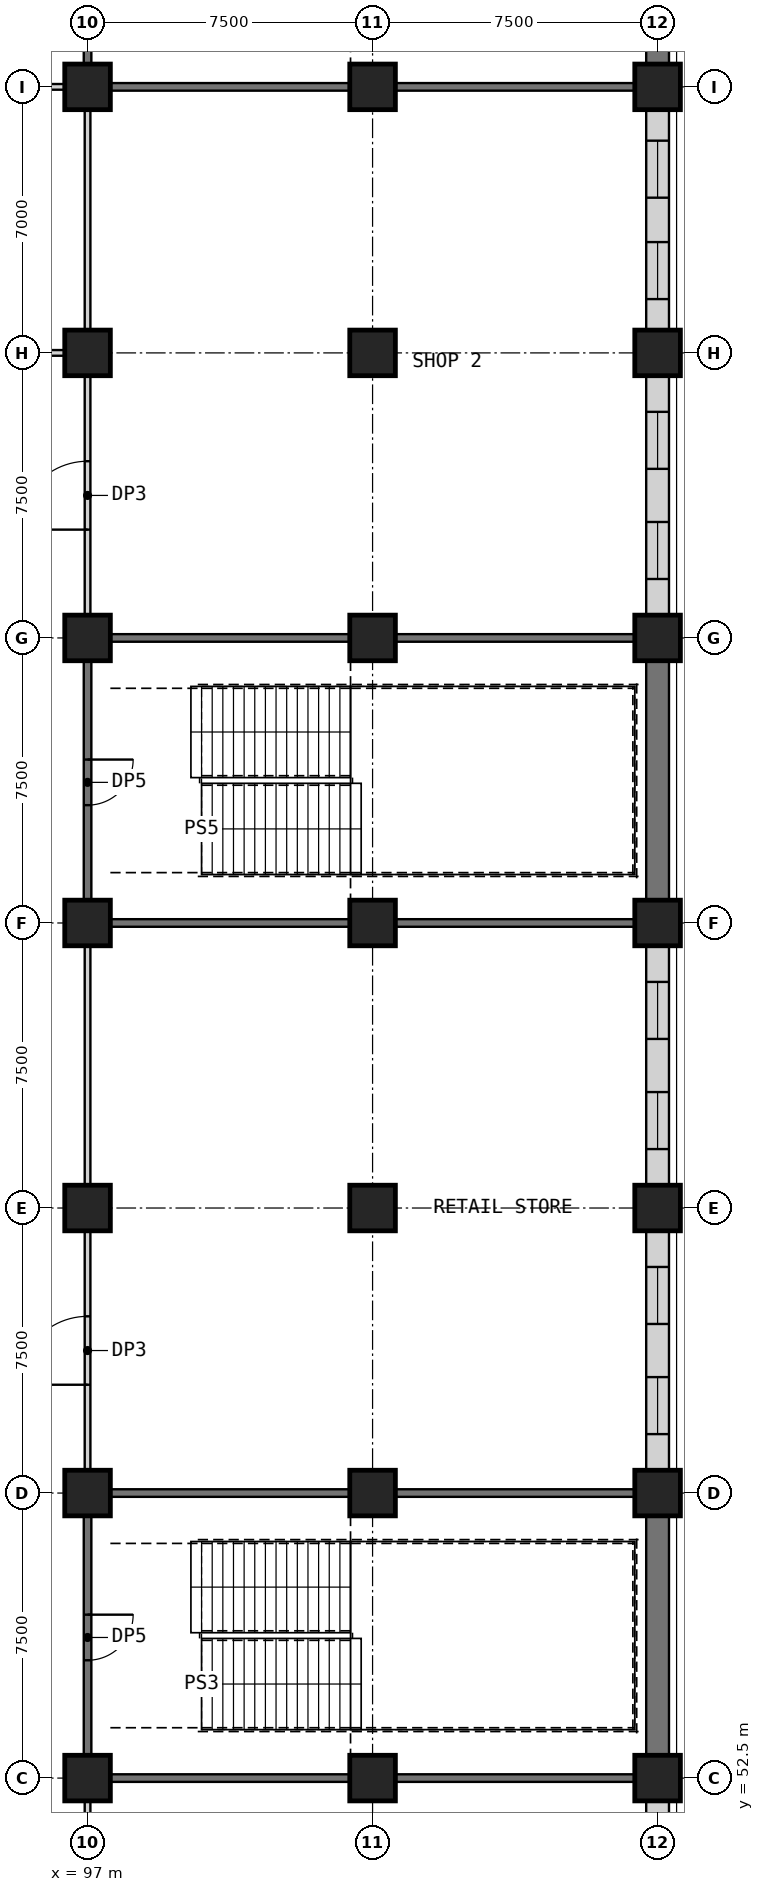
"""IFC4 building model, lengths in metres.
Left out: names, types, materials, properties, quantities, classifications, styles, units other than length and angle.
Written with IfcOpenShell. Run it as: python <this file> out.ifc"""

import sys

from ifc_helpers import new_model, si_unit, direction, frame, frame_2d, origin, origin_2d, place, context, subcontext, project, spatial, rectangle, extrude, element, fill, save


model = new_model("IFC4")
c1 = context("Model", 3, precision=1e-05, world=origin(), true_north=direction((0.0, 1.0)))
c2 = subcontext(c1, "Body", "Model", "MODEL_VIEW")
j1 = project(units=[si_unit("LENGTHUNIT", "METRE"), si_unit("PLANEANGLEUNIT", "RADIAN")], contexts=[c1])
p1 = place(None, origin())
s1 = spatial("IfcSite", under=j1, at=p1, CompositionType="ELEMENT")
p2 = place(p1, origin())
s2 = spatial("IfcBuilding", under=s1, at=p2, CompositionType="ELEMENT")
p3 = place(p2, frame((0.0, 0.0, 13.5)))
s3 = spatial("IfcBuildingStorey", under=s2, at=p3, CompositionType="ELEMENT", Elevation=13.5)
for number, where, z_axis, x_axis in (
    (1, (97.0, 52.5, 0.0), (0.0, 0.0, 1.0), (1.0, 0.0, 0.0)),
    (2, (97.0, 60.0, 0.0), (0.0, 0.0, 1.0), (1.0, 0.0, 0.0)),
    (3, (97.0, 67.5, 0.0), (0.0, 0.0, 1.0), (1.0, 0.0, 0.0)),
    (4, (97.0, 75.0, 0.0), (0.0, 0.0, 1.0), (1.0, 0.0, 0.0)),
    (5, (97.0, 82.5, 0.0), (0.0, 0.0, 1.0), (1.0, 0.0, 0.0)),
    (6, (97.0, 90.0, 0.0), (0.0, 0.0, 1.0), (1.0, 0.0, 0.0)),
    (7, (97.0, 97.0, 0.0), (0.0, 0.0, 1.0), (1.0, 0.0, 0.0)),
    (8, (104.5, 52.5, 0.0), (0.0, 0.0, 1.0), (1.0, 0.0, 0.0)),
    (9, (104.5, 60.0, 0.0), (0.0, 0.0, 1.0), (1.0, 0.0, 0.0)),
    (10, (104.5, 67.5, 0.0), (0.0, 0.0, 1.0), (1.0, 0.0, 0.0)),
    (11, (104.5, 75.0, 0.0), (0.0, 0.0, 1.0), (1.0, 0.0, 0.0)),
    (12, (104.5, 82.5, 0.0), (0.0, 0.0, 1.0), (1.0, 0.0, 0.0)),
    (13, (104.5, 90.0, 0.0), (0.0, 0.0, 1.0), (1.0, 0.0, 0.0)),
    (14, (104.5, 97.0, 0.0), (0.0, 0.0, 1.0), (1.0, 0.0, 0.0)),
    (15, (112.0, 52.5, 0.0), (0.0, 0.0, 1.0), (1.0, 0.0, 0.0)),
    (16, (112.0, 60.0, 0.0), (0.0, 0.0, 1.0), (1.0, 0.0, 0.0)),
    (17, (112.0, 67.5, 0.0), (0.0, 0.0, 1.0), (1.0, 0.0, 0.0)),
    (18, (112.0, 75.0, 0.0), (0.0, 0.0, 1.0), (1.0, 0.0, 0.0)),
    (19, (112.0, 82.5, 0.0), (0.0, 0.0, 1.0), (1.0, 0.0, 0.0)),
    (20, (112.0, 90.0, 0.0), (0.0, 0.0, 1.0), (1.0, 0.0, 0.0)),
    (21, (112.0, 97.0, 0.0), (0.0, 0.0, 1.0), (1.0, 0.0, 0.0)),
):
    element("IfcColumn", number, at=place(p3, frame(where, z_axis=z_axis, x_axis=x_axis)), inside=s3, PredefinedType="COLUMN", context=c2, shape_type="SweptSolid", body=[
        extrude(rectangle(XDim=1.2, YDim=1.2, at=origin_2d()), origin(), (0.0, 0.0, 1.0), 5.0),
    ])
p4 = place(p3, frame((90.0, 97.0, 0.0), z_axis=(0.0, 0.0, 1.0), x_axis=(1.0, 0.0, 0.0)))
e22 = element("IfcWall", 22, at=p4, inside=s3, PredefinedType="PARTITIONING", context=c2, shape_type="SweptSolid", body=[
    extrude(rectangle(XDim=6.4, YDim=0.15, at=frame_2d((3.2, 0.0))), origin(), (0.0, 0.0, 1.0), 4.7),
])
for number, where, z_axis, x_axis in (
    (23, (97.6, 97.0, 0.0), (0.0, 0.0, 1.0), (1.0, 0.0, 0.0)),
    (24, (105.1, 97.0, 0.0), (0.0, 0.0, 1.0), (1.0, 0.0, 0.0)),
    (25, (97.6, 52.5, 0.0), (0.0, 0.0, 1.0), (1.0, 0.0, 0.0)),
    (26, (105.1, 52.5, 0.0), (0.0, 0.0, 1.0), (1.0, 0.0, 0.0)),
    (27, (97.6, 60.0, 0.0), (0.0, 0.0, 1.0), (1.0, 0.0, 0.0)),
    (28, (105.1, 60.0, 0.0), (0.0, 0.0, 1.0), (1.0, 0.0, 0.0)),
    (29, (97.6, 75.0, 0.0), (0.0, 0.0, 1.0), (1.0, 0.0, 0.0)),
    (30, (105.1, 75.0, 0.0), (0.0, 0.0, 1.0), (1.0, 0.0, 0.0)),
    (31, (97.6, 82.5, 0.0), (0.0, 0.0, 1.0), (1.0, 0.0, 0.0)),
    (32, (105.1, 82.5, 0.0), (0.0, 0.0, 1.0), (1.0, 0.0, 0.0)),
):
    element("IfcWall", number, at=place(p3, frame(where, z_axis=z_axis, x_axis=x_axis)), inside=s3, PredefinedType="SHEAR", context=c2, shape_type="SweptSolid", body=[
        extrude(rectangle(XDim=6.3, YDim=0.2, at=frame_2d((3.15, 0.0))), origin(), (0.0, 0.0, 1.0), 4.7),
    ])
p5 = place(p3, frame((90.0, 90.0, 0.0), z_axis=(0.0, 0.0, 1.0), x_axis=(1.0, 0.0, 0.0)))
e33 = element("IfcWall", 33, at=p5, inside=s3, PredefinedType="PARTITIONING", context=c2, shape_type="SweptSolid", body=[
    extrude(rectangle(XDim=6.4, YDim=0.15, at=frame_2d((3.2, 0.0))), origin(), (0.0, 0.0, 1.0), 4.7),
])
p6 = place(p3, frame((97.0, 46.1, 0.0), z_axis=(0.0, 0.0, 1.0), x_axis=(0.0, 1.0, 0.0)))
e34 = element("IfcWall", 34, at=p6, inside=s3, PredefinedType="PARTITIONING", context=c2, shape_type="SweptSolid", body=[
    extrude(rectangle(XDim=5.8, YDim=0.15, at=frame_2d((2.9, 0.0))), origin(), (0.0, 0.0, 1.0), 4.7),
])
p7 = place(p6, frame((2.5, 0.0, 0.0)))
e35 = element("IfcOpeningElement", 35, at=p7, cuts=e34, PredefinedType="OPENING", context=c2, shape_type="SweptSolid", body=[
    extrude(rectangle(XDim=1.0, YDim=2.1, at=frame_2d((0.5, 1.05))), frame((0.0, 0.085, 0.0), z_axis=(0.0, -1.0, 0.0), x_axis=(1.0, 0.0, 0.0)), (0.0, 0.0, 1.0), 0.17),
])
p8 = place(p3, frame((97.0, 59.4, 0.0), z_axis=(0.0, 0.0, 1.0), x_axis=(0.0, -1.0, 0.0)))
e36 = element("IfcWall", 36, at=p8, inside=s3, PredefinedType="SHEAR", context=c2, shape_type="SweptSolid", body=[
    extrude(rectangle(XDim=6.3, YDim=0.2, at=frame_2d((3.15, 0.0))), origin(), (0.0, 0.0, 1.0), 4.7),
])
p9 = place(p8, frame((2.6, 0.0, 0.0)))
e37 = element("IfcOpeningElement", 37, at=p9, cuts=e36, PredefinedType="OPENING", context=c2, shape_type="SweptSolid", body=[
    extrude(rectangle(XDim=1.2, YDim=2.1, at=frame_2d((0.6, 1.05))), frame((0.0, 0.11, 0.0), z_axis=(0.0, -1.0, 0.0), x_axis=(1.0, 0.0, 0.0)), (0.0, 0.0, 1.0), 0.22),
])
p10 = place(p3, frame((97.0, 60.6, 0.0), z_axis=(0.0, 0.0, 1.0), x_axis=(0.0, 1.0, 0.0)))
e38 = element("IfcWall", 38, at=p10, inside=s3, PredefinedType="PARTITIONING", context=c2, shape_type="SweptSolid", body=[
    extrude(rectangle(XDim=6.3, YDim=0.15, at=frame_2d((3.15, 0.0))), origin(), (0.0, 0.0, 1.0), 4.7),
])
p11 = place(p10, frame((2.25, 0.0, 0.0)))
e39 = element("IfcOpeningElement", 39, at=p11, cuts=e38, PredefinedType="OPENING", context=c2, shape_type="SweptSolid", body=[
    extrude(rectangle(XDim=1.8, YDim=2.4, at=frame_2d((0.9, 1.2))), frame((0.0, 0.085, 0.0), z_axis=(0.0, -1.0, 0.0), x_axis=(1.0, 0.0, 0.0)), (0.0, 0.0, 1.0), 0.17),
])
p12 = place(p3, frame((97.0, 68.1, 0.0), z_axis=(0.0, 0.0, 1.0), x_axis=(0.0, 1.0, 0.0)))
e40 = element("IfcWall", 40, at=p12, inside=s3, PredefinedType="PARTITIONING", context=c2, shape_type="SweptSolid", body=[
    extrude(rectangle(XDim=6.3, YDim=0.15, at=frame_2d((3.15, 0.0))), origin(), (0.0, 0.0, 1.0), 4.7),
])
p13 = place(p3, frame((97.0, 81.9, 0.0), z_axis=(0.0, 0.0, 1.0), x_axis=(0.0, -1.0, 0.0)))
e41 = element("IfcWall", 41, at=p13, inside=s3, PredefinedType="SHEAR", context=c2, shape_type="SweptSolid", body=[
    extrude(rectangle(XDim=6.3, YDim=0.2, at=frame_2d((3.15, 0.0))), origin(), (0.0, 0.0, 1.0), 4.7),
])
p14 = place(p13, frame((2.6, 0.0, 0.0)))
e42 = element("IfcOpeningElement", 42, at=p14, cuts=e41, PredefinedType="OPENING", context=c2, shape_type="SweptSolid", body=[
    extrude(rectangle(XDim=1.2, YDim=2.1, at=frame_2d((0.6, 1.05))), frame((0.0, 0.11, 0.0), z_axis=(0.0, -1.0, 0.0), x_axis=(1.0, 0.0, 0.0)), (0.0, 0.0, 1.0), 0.22),
])
p15 = place(p3, frame((97.0, 83.1, 0.0), z_axis=(0.0, 0.0, 1.0), x_axis=(0.0, 1.0, 0.0)))
e43 = element("IfcWall", 43, at=p15, inside=s3, PredefinedType="PARTITIONING", context=c2, shape_type="SweptSolid", body=[
    extrude(rectangle(XDim=6.3, YDim=0.15, at=frame_2d((3.15, 0.0))), origin(), (0.0, 0.0, 1.0), 4.7),
])
p16 = place(p15, frame((2.25, 0.0, 0.0)))
e44 = element("IfcOpeningElement", 44, at=p16, cuts=e43, PredefinedType="OPENING", context=c2, shape_type="SweptSolid", body=[
    extrude(rectangle(XDim=1.8, YDim=2.4, at=frame_2d((0.9, 1.2))), frame((0.0, 0.085, 0.0), z_axis=(0.0, -1.0, 0.0), x_axis=(1.0, 0.0, 0.0)), (0.0, 0.0, 1.0), 0.17),
])
p17 = place(p3, frame((97.0, 90.6, 0.0), z_axis=(0.0, 0.0, 1.0), x_axis=(0.0, 1.0, 0.0)))
e45 = element("IfcWall", 45, at=p17, inside=s3, PredefinedType="PARTITIONING", context=c2, shape_type="SweptSolid", body=[
    extrude(rectangle(XDim=5.8, YDim=0.15, at=frame_2d((2.9, 0.0))), origin(), (0.0, 0.0, 1.0), 4.7),
])
p18 = place(p3, frame((97.0, 103.9, 0.0), z_axis=(0.0, 0.0, 1.0), x_axis=(0.0, -1.0, 0.0)))
e46 = element("IfcWall", 46, at=p18, inside=s3, PredefinedType="SHEAR", context=c2, shape_type="SweptSolid", body=[
    extrude(rectangle(XDim=6.3, YDim=0.2, at=frame_2d((3.15, 0.0))), origin(), (0.0, 0.0, 1.0), 4.7),
])
p19 = place(p18, frame((2.6, 0.0, 0.0)))
e47 = element("IfcOpeningElement", 47, at=p19, cuts=e46, PredefinedType="OPENING", context=c2, shape_type="SweptSolid", body=[
    extrude(rectangle(XDim=1.2, YDim=2.1, at=frame_2d((0.6, 1.05))), frame((0.0, 0.11, 0.0), z_axis=(0.0, -1.0, 0.0), x_axis=(1.0, 0.0, 0.0)), (0.0, 0.0, 1.0), 0.22),
])
p20 = place(p3, frame((112.0, 46.1, 0.0), z_axis=(0.0, 0.0, 1.0), x_axis=(0.0, 1.0, 0.0)))
e48 = element("IfcWall", 48, at=p20, inside=s3, PredefinedType="PARTITIONING", context=c2, shape_type="SweptSolid", body=[
    extrude(rectangle(XDim=5.8, YDim=0.6, at=frame_2d((2.9, 0.0))), origin(), (0.0, 0.0, 1.0), 4.1),
])
p21 = place(p20, frame((0.816, 0.0, 0.9)))
e49 = element("IfcOpeningElement", 49, at=p21, cuts=e48, PredefinedType="OPENING", context=c2, shape_type="SweptSolid", body=[
    extrude(rectangle(XDim=1.5, YDim=2.8, at=frame_2d((0.75, 1.4))), frame((0.0, 0.31, 0.0), z_axis=(0.0, -1.0, 0.0), x_axis=(1.0, 0.0, 0.0)), (0.0, 0.0, 1.0), 0.62),
])
p22 = place(p20, frame((3.484, 0.0, 0.9)))
e50 = element("IfcOpeningElement", 50, at=p22, cuts=e48, PredefinedType="OPENING", context=c2, shape_type="SweptSolid", body=[
    extrude(rectangle(XDim=1.5, YDim=2.8, at=frame_2d((0.75, 1.4))), frame((0.0, 0.31, 0.0), z_axis=(0.0, -1.0, 0.0), x_axis=(1.0, 0.0, 0.0)), (0.0, 0.0, 1.0), 0.62),
])
p23 = place(p3, frame((112.0, 53.1, 0.0), z_axis=(0.0, 0.0, 1.0), x_axis=(0.0, 1.0, 0.0)))
e51 = element("IfcWall", 51, at=p23, inside=s3, PredefinedType="PARTITIONING", context=c2, shape_type="SweptSolid", body=[
    extrude(rectangle(XDim=6.3, YDim=0.6, at=frame_2d((3.15, 0.0))), origin(), (0.0, 0.0, 1.0), 4.1),
])
p24 = place(p3, frame((112.0, 60.6, 0.0), z_axis=(0.0, 0.0, 1.0), x_axis=(0.0, 1.0, 0.0)))
e52 = element("IfcWall", 52, at=p24, inside=s3, PredefinedType="PARTITIONING", context=c2, shape_type="SweptSolid", body=[
    extrude(rectangle(XDim=6.3, YDim=0.6, at=frame_2d((3.15, 0.0))), origin(), (0.0, 0.0, 1.0), 4.1),
])
p25 = place(p24, frame((0.951, 0.0, 0.9)))
e53 = element("IfcOpeningElement", 53, at=p25, cuts=e52, PredefinedType="OPENING", context=c2, shape_type="SweptSolid", body=[
    extrude(rectangle(XDim=1.5, YDim=2.8, at=frame_2d((0.75, 1.4))), frame((0.0, 0.31, 0.0), z_axis=(0.0, -1.0, 0.0), x_axis=(1.0, 0.0, 0.0)), (0.0, 0.0, 1.0), 0.62),
])
p26 = place(p24, frame((3.849, 0.0, 0.9)))
e54 = element("IfcOpeningElement", 54, at=p26, cuts=e52, PredefinedType="OPENING", context=c2, shape_type="SweptSolid", body=[
    extrude(rectangle(XDim=1.5, YDim=2.8, at=frame_2d((0.75, 1.4))), frame((0.0, 0.31, 0.0), z_axis=(0.0, -1.0, 0.0), x_axis=(1.0, 0.0, 0.0)), (0.0, 0.0, 1.0), 0.62),
])
p27 = place(p3, frame((112.0, 68.1, 0.0), z_axis=(0.0, 0.0, 1.0), x_axis=(0.0, 1.0, 0.0)))
e55 = element("IfcWall", 55, at=p27, inside=s3, PredefinedType="PARTITIONING", context=c2, shape_type="SweptSolid", body=[
    extrude(rectangle(XDim=6.3, YDim=0.6, at=frame_2d((3.15, 0.0))), origin(), (0.0, 0.0, 1.0), 4.1),
])
p28 = place(p27, frame((0.951, 0.0, 0.9)))
e56 = element("IfcOpeningElement", 56, at=p28, cuts=e55, PredefinedType="OPENING", context=c2, shape_type="SweptSolid", body=[
    extrude(rectangle(XDim=1.5, YDim=2.8, at=frame_2d((0.75, 1.4))), frame((0.0, 0.31, 0.0), z_axis=(0.0, -1.0, 0.0), x_axis=(1.0, 0.0, 0.0)), (0.0, 0.0, 1.0), 0.62),
])
p29 = place(p27, frame((3.849, 0.0, 0.9)))
e57 = element("IfcOpeningElement", 57, at=p29, cuts=e55, PredefinedType="OPENING", context=c2, shape_type="SweptSolid", body=[
    extrude(rectangle(XDim=1.5, YDim=2.8, at=frame_2d((0.75, 1.4))), frame((0.0, 0.31, 0.0), z_axis=(0.0, -1.0, 0.0), x_axis=(1.0, 0.0, 0.0)), (0.0, 0.0, 1.0), 0.62),
])
p30 = place(p3, frame((112.0, 75.6, 0.0), z_axis=(0.0, 0.0, 1.0), x_axis=(0.0, 1.0, 0.0)))
e58 = element("IfcWall", 58, at=p30, inside=s3, PredefinedType="PARTITIONING", context=c2, shape_type="SweptSolid", body=[
    extrude(rectangle(XDim=6.3, YDim=0.6, at=frame_2d((3.15, 0.0))), origin(), (0.0, 0.0, 1.0), 4.1),
])
p31 = place(p3, frame((112.0, 83.1, 0.0), z_axis=(0.0, 0.0, 1.0), x_axis=(0.0, 1.0, 0.0)))
e59 = element("IfcWall", 59, at=p31, inside=s3, PredefinedType="PARTITIONING", context=c2, shape_type="SweptSolid", body=[
    extrude(rectangle(XDim=6.3, YDim=0.6, at=frame_2d((3.15, 0.0))), origin(), (0.0, 0.0, 1.0), 4.1),
])
p32 = place(p31, frame((0.951, 0.0, 0.9)))
e60 = element("IfcOpeningElement", 60, at=p32, cuts=e59, PredefinedType="OPENING", context=c2, shape_type="SweptSolid", body=[
    extrude(rectangle(XDim=1.5, YDim=2.8, at=frame_2d((0.75, 1.4))), frame((0.0, 0.31, 0.0), z_axis=(0.0, -1.0, 0.0), x_axis=(1.0, 0.0, 0.0)), (0.0, 0.0, 1.0), 0.62),
])
p33 = place(p31, frame((3.849, 0.0, 0.9)))
e61 = element("IfcOpeningElement", 61, at=p33, cuts=e59, PredefinedType="OPENING", context=c2, shape_type="SweptSolid", body=[
    extrude(rectangle(XDim=1.5, YDim=2.8, at=frame_2d((0.75, 1.4))), frame((0.0, 0.31, 0.0), z_axis=(0.0, -1.0, 0.0), x_axis=(1.0, 0.0, 0.0)), (0.0, 0.0, 1.0), 0.62),
])
p34 = place(p3, frame((112.0, 90.6, 0.0), z_axis=(0.0, 0.0, 1.0), x_axis=(0.0, 1.0, 0.0)))
e62 = element("IfcWall", 62, at=p34, inside=s3, PredefinedType="PARTITIONING", context=c2, shape_type="SweptSolid", body=[
    extrude(rectangle(XDim=5.8, YDim=0.6, at=frame_2d((2.9, 0.0))), origin(), (0.0, 0.0, 1.0), 4.1),
])
p35 = place(p34, frame((0.816, 0.0, 0.9)))
e63 = element("IfcOpeningElement", 63, at=p35, cuts=e62, PredefinedType="OPENING", context=c2, shape_type="SweptSolid", body=[
    extrude(rectangle(XDim=1.5, YDim=2.8, at=frame_2d((0.75, 1.4))), frame((0.0, 0.31, 0.0), z_axis=(0.0, -1.0, 0.0), x_axis=(1.0, 0.0, 0.0)), (0.0, 0.0, 1.0), 0.62),
])
p36 = place(p34, frame((3.484, 0.0, 0.9)))
e64 = element("IfcOpeningElement", 64, at=p36, cuts=e62, PredefinedType="OPENING", context=c2, shape_type="SweptSolid", body=[
    extrude(rectangle(XDim=1.5, YDim=2.8, at=frame_2d((0.75, 1.4))), frame((0.0, 0.31, 0.0), z_axis=(0.0, -1.0, 0.0), x_axis=(1.0, 0.0, 0.0)), (0.0, 0.0, 1.0), 0.62),
])
p37 = place(p3, frame((112.0, 97.6, 0.0), z_axis=(0.0, 0.0, 1.0), x_axis=(0.0, 1.0, 0.0)))
e65 = element("IfcWall", 65, at=p37, inside=s3, PredefinedType="PARTITIONING", context=c2, shape_type="SweptSolid", body=[
    extrude(rectangle(XDim=6.3, YDim=0.6, at=frame_2d((3.15, 0.0))), origin(), (0.0, 0.0, 1.0), 4.1),
])
p38 = place(p9, origin())
e66 = element("IfcDoor", 66, at=p38, inside=s3, OperationType="SINGLE_SWING_LEFT", PredefinedType="DOOR", context=c2, shape_type="SweptSolid", body=[
    extrude(rectangle(XDim=1.2, YDim=2.1, at=frame_2d((0.6, 1.05))), frame((0.0, 0.025, 0.0), z_axis=(0.0, -1.0, 0.0), x_axis=(1.0, 0.0, 0.0)), (0.0, 0.0, 1.0), 0.05),
])
fill(e37, e66)
p39 = place(p11, origin())
e67 = element("IfcDoor", 67, at=p39, inside=s3, OperationType="SINGLE_SWING_LEFT", PredefinedType="DOOR", context=c2, shape_type="SweptSolid", body=[
    extrude(rectangle(XDim=1.8, YDim=2.4, at=frame_2d((0.9, 1.2))), frame((0.0, 0.025, 0.0), z_axis=(0.0, -1.0, 0.0), x_axis=(1.0, 0.0, 0.0)), (0.0, 0.0, 1.0), 0.05),
])
fill(e39, e67)
p40 = place(p14, origin())
e68 = element("IfcDoor", 68, at=p40, inside=s3, OperationType="SINGLE_SWING_LEFT", PredefinedType="DOOR", context=c2, shape_type="SweptSolid", body=[
    extrude(rectangle(XDim=1.2, YDim=2.1, at=frame_2d((0.6, 1.05))), frame((0.0, 0.025, 0.0), z_axis=(0.0, -1.0, 0.0), x_axis=(1.0, 0.0, 0.0)), (0.0, 0.0, 1.0), 0.05),
])
fill(e42, e68)
p41 = place(p16, origin())
e69 = element("IfcDoor", 69, at=p41, inside=s3, OperationType="SINGLE_SWING_LEFT", PredefinedType="DOOR", context=c2, shape_type="SweptSolid", body=[
    extrude(rectangle(XDim=1.8, YDim=2.4, at=frame_2d((0.9, 1.2))), frame((0.0, 0.025, 0.0), z_axis=(0.0, -1.0, 0.0), x_axis=(1.0, 0.0, 0.0)), (0.0, 0.0, 1.0), 0.05),
])
fill(e44, e69)
p42 = place(p25, origin())
e70 = element("IfcWindow", 70, at=p42, inside=s3, PartitioningType="SINGLE_PANEL", PredefinedType="WINDOW", context=c2, shape_type="SweptSolid", body=[
    extrude(rectangle(XDim=1.5, YDim=2.8, at=frame_2d((0.75, 1.4))), frame((0.0, 0.03, 0.0), z_axis=(0.0, -1.0, 0.0), x_axis=(1.0, 0.0, 0.0)), (0.0, 0.0, 1.0), 0.06),
])
fill(e53, e70)
p43 = place(p26, origin())
e71 = element("IfcWindow", 71, at=p43, inside=s3, PartitioningType="SINGLE_PANEL", PredefinedType="WINDOW", context=c2, shape_type="SweptSolid", body=[
    extrude(rectangle(XDim=1.5, YDim=2.8, at=frame_2d((0.75, 1.4))), frame((0.0, 0.03, 0.0), z_axis=(0.0, -1.0, 0.0), x_axis=(1.0, 0.0, 0.0)), (0.0, 0.0, 1.0), 0.06),
])
fill(e54, e71)
p44 = place(p28, origin())
e72 = element("IfcWindow", 72, at=p44, inside=s3, PartitioningType="SINGLE_PANEL", PredefinedType="WINDOW", context=c2, shape_type="SweptSolid", body=[
    extrude(rectangle(XDim=1.5, YDim=2.8, at=frame_2d((0.75, 1.4))), frame((0.0, 0.03, 0.0), z_axis=(0.0, -1.0, 0.0), x_axis=(1.0, 0.0, 0.0)), (0.0, 0.0, 1.0), 0.06),
])
fill(e56, e72)
p45 = place(p29, origin())
e73 = element("IfcWindow", 73, at=p45, inside=s3, PartitioningType="SINGLE_PANEL", PredefinedType="WINDOW", context=c2, shape_type="SweptSolid", body=[
    extrude(rectangle(XDim=1.5, YDim=2.8, at=frame_2d((0.75, 1.4))), frame((0.0, 0.03, 0.0), z_axis=(0.0, -1.0, 0.0), x_axis=(1.0, 0.0, 0.0)), (0.0, 0.0, 1.0), 0.06),
])
fill(e57, e73)
p46 = place(p32, origin())
e74 = element("IfcWindow", 74, at=p46, inside=s3, PartitioningType="SINGLE_PANEL", PredefinedType="WINDOW", context=c2, shape_type="SweptSolid", body=[
    extrude(rectangle(XDim=1.5, YDim=2.8, at=frame_2d((0.75, 1.4))), frame((0.0, 0.03, 0.0), z_axis=(0.0, -1.0, 0.0), x_axis=(1.0, 0.0, 0.0)), (0.0, 0.0, 1.0), 0.06),
])
fill(e60, e74)
p47 = place(p33, origin())
e75 = element("IfcWindow", 75, at=p47, inside=s3, PartitioningType="SINGLE_PANEL", PredefinedType="WINDOW", context=c2, shape_type="SweptSolid", body=[
    extrude(rectangle(XDim=1.5, YDim=2.8, at=frame_2d((0.75, 1.4))), frame((0.0, 0.03, 0.0), z_axis=(0.0, -1.0, 0.0), x_axis=(1.0, 0.0, 0.0)), (0.0, 0.0, 1.0), 0.06),
])
fill(e61, e75)
p48 = place(p35, origin())
e76 = element("IfcWindow", 76, at=p48, inside=s3, PartitioningType="SINGLE_PANEL", PredefinedType="WINDOW", context=c2, shape_type="SweptSolid", body=[
    extrude(rectangle(XDim=1.5, YDim=2.8, at=frame_2d((0.75, 1.4))), frame((0.0, 0.03, 0.0), z_axis=(0.0, -1.0, 0.0), x_axis=(1.0, 0.0, 0.0)), (0.0, 0.0, 1.0), 0.06),
])
fill(e63, e76)
p49 = place(p36, origin())
e77 = element("IfcWindow", 77, at=p49, inside=s3, PartitioningType="SINGLE_PANEL", PredefinedType="WINDOW", context=c2, shape_type="SweptSolid", body=[
    extrude(rectangle(XDim=1.5, YDim=2.8, at=frame_2d((0.75, 1.4))), frame((0.0, 0.03, 0.0), z_axis=(0.0, -1.0, 0.0), x_axis=(1.0, 0.0, 0.0)), (0.0, 0.0, 1.0), 0.06),
])
fill(e64, e77)
save(model, sys.argv[1])
